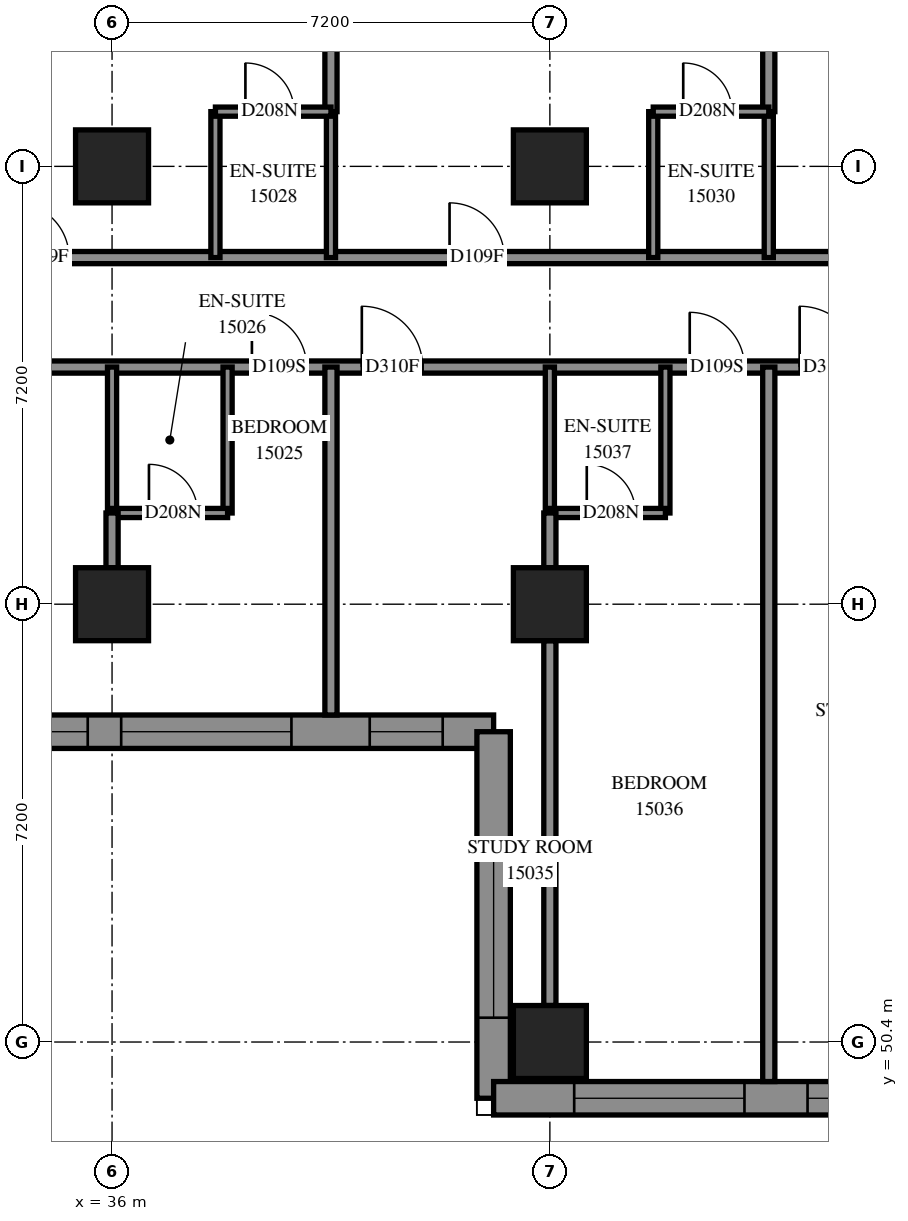
"""IFC4 building model, lengths in metres.
Left out: names, types, materials, properties, quantities, classifications, styles, units other than length and angle.
Written with IfcOpenShell. Run it as: python <this file> out.ifc"""

import sys

from ifc_helpers import new_model, si_unit, direction, frame, frame_2d, origin, origin_2d, place, context, subcontext, project, spatial, polyline, rectangle, outline, extrude, element, fill, save


model = new_model("IFC4")
c1 = context("Model", 3, precision=1e-05, world=origin(), true_north=direction((0.0, 1.0)))
c2 = subcontext(c1, "Body", "Model", "MODEL_VIEW")
j1 = project(units=[si_unit("LENGTHUNIT", "METRE"), si_unit("PLANEANGLEUNIT", "RADIAN")], contexts=[c1])
p1 = place(None, origin())
s1 = spatial("IfcSite", under=j1, at=p1, CompositionType="ELEMENT")
p2 = place(p1, origin())
s2 = spatial("IfcBuilding", under=s1, at=p2, CompositionType="ELEMENT")
p3 = place(p2, frame((0.0, 0.0, 57.6)))
s3 = spatial("IfcBuildingStorey", under=s2, at=p3, CompositionType="ELEMENT", Elevation=57.6)
for number, where, z_axis, x_axis in (
    (1, (36.0, 57.6, 0.0), (0.0, 0.0, 1.0), (1.0, 0.0, 0.0)),
    (2, (36.0, 64.8, 0.0), (0.0, 0.0, 1.0), (1.0, 0.0, 0.0)),
    (3, (43.2, 50.4, 0.0), (0.0, 0.0, 1.0), (1.0, 0.0, 0.0)),
    (4, (43.2, 57.6, 0.0), (0.0, 0.0, 1.0), (1.0, 0.0, 0.0)),
    (5, (43.2, 64.8, 0.0), (0.0, 0.0, 1.0), (1.0, 0.0, 0.0)),
):
    element("IfcColumn", number, at=place(p3, frame(where, z_axis=z_axis, x_axis=x_axis)), inside=s3, PredefinedType="COLUMN", context=c2, shape_type="SweptSolid", body=[
        extrude(rectangle(XDim=1.2, YDim=1.2, at=origin_2d()), origin(), (0.0, 0.0, 1.0), 3.1),
    ])
p4 = place(p3, frame((27.875, 55.503, 0.0), z_axis=(0.0, 0.0, 1.0), x_axis=(1.0, 0.0, 0.0)))
e6 = element("IfcWall", 6, at=p4, inside=s3, PredefinedType="SOLIDWALL", context=c2, shape_type="SweptSolid", body=[
    extrude(outline(polyline([(-0.275, -0.275), (14.125, -0.275), (14.675, 0.275), (0.275, 0.275), (-0.275, -0.275)])), origin(), (0.0, 0.0, 1.0), 3.1),
])
p5 = place(p4, frame((1.325, 0.0, 0.5)))
e7 = element("IfcOpeningElement", 7, at=p5, cuts=e6, PredefinedType="OPENING", context=c2, shape_type="SweptSolid", body=[
    extrude(rectangle(XDim=2.8, YDim=2.45, at=frame_2d((1.4, 1.225))), frame((0.0, 0.285, 0.0), z_axis=(0.0, -1.0, 0.0), x_axis=(1.0, 0.0, 0.0)), (0.0, 0.0, 1.0), 0.57),
])
p6 = place(p4, frame((4.925, 0.0, 0.5)))
e8 = element("IfcOpeningElement", 8, at=p6, cuts=e6, PredefinedType="OPENING", context=c2, shape_type="SweptSolid", body=[
    extrude(rectangle(XDim=2.8, YDim=2.45, at=frame_2d((1.4, 1.225))), frame((0.0, 0.285, 0.0), z_axis=(0.0, -1.0, 0.0), x_axis=(1.0, 0.0, 0.0)), (0.0, 0.0, 1.0), 0.57),
])
p7 = place(p4, frame((8.275, 0.0, 0.5)))
e9 = element("IfcOpeningElement", 9, at=p7, cuts=e6, PredefinedType="OPENING", context=c2, shape_type="SweptSolid", body=[
    extrude(rectangle(XDim=2.8, YDim=2.45, at=frame_2d((1.4, 1.225))), frame((0.0, 0.285, 0.0), z_axis=(0.0, -1.0, 0.0), x_axis=(1.0, 0.0, 0.0)), (0.0, 0.0, 1.0), 0.57),
])
p8 = place(p4, frame((12.363, 0.0, 0.5)))
e10 = element("IfcOpeningElement", 10, at=p8, cuts=e6, PredefinedType="OPENING", context=c2, shape_type="SweptSolid", body=[
    extrude(rectangle(XDim=1.2, YDim=2.45, at=frame_2d((0.6, 1.225))), frame((0.0, 0.285, 0.0), z_axis=(0.0, -1.0, 0.0), x_axis=(1.0, 0.0, 0.0)), (0.0, 0.0, 1.0), 0.57),
])
p9 = place(p3, frame((42.275, 55.503, 0.0), z_axis=(0.0, 0.0, 1.0), x_axis=(0.0, -1.0, 0.0)))
e11 = element("IfcWall", 11, at=p9, inside=s3, PredefinedType="SOLIDWALL", context=c2, shape_type="SweptSolid", body=[
    extrude(outline(polyline([(0.275, -0.275), (6.303, -0.275), (5.753, 0.275), (-0.275, 0.275), (0.275, -0.275)])), origin(), (0.0, 0.0, 1.0), 3.1),
])
p10 = place(p9, frame((1.903, 0.0, 0.5)))
e12 = element("IfcOpeningElement", 12, at=p10, cuts=e11, PredefinedType="OPENING", context=c2, shape_type="SweptSolid", body=[
    extrude(rectangle(XDim=2.8, YDim=2.45, at=frame_2d((1.4, 1.225))), frame((0.0, 0.285, 0.0), z_axis=(0.0, -1.0, 0.0), x_axis=(1.0, 0.0, 0.0)), (0.0, 0.0, 1.0), 0.57),
])
p11 = place(p3, frame((42.275, 49.475, 0.0), z_axis=(0.0, 0.0, 1.0), x_axis=(1.0, 0.0, 0.0)))
e13 = element("IfcWall", 13, at=p11, inside=s3, PredefinedType="SOLIDWALL", context=c2, shape_type="SweptSolid", body=[
    extrude(outline(polyline([(-0.275, -0.275), (6.925, -0.275), (7.475, 0.275), (0.275, 0.275), (-0.275, -0.275)])), origin(), (0.0, 0.0, 1.0), 3.1),
])
p12 = place(p11, frame((1.325, 0.0, 0.5)))
e14 = element("IfcOpeningElement", 14, at=p12, cuts=e13, PredefinedType="OPENING", context=c2, shape_type="SweptSolid", body=[
    extrude(rectangle(XDim=2.8, YDim=2.45, at=frame_2d((1.4, 1.225))), frame((0.0, 0.285, 0.0), z_axis=(0.0, -1.0, 0.0), x_axis=(1.0, 0.0, 0.0)), (0.0, 0.0, 1.0), 0.57),
])
p13 = place(p11, frame((5.162, 0.0, 0.5)))
e15 = element("IfcOpeningElement", 15, at=p13, cuts=e13, PredefinedType="OPENING", context=c2, shape_type="SweptSolid", body=[
    extrude(rectangle(XDim=1.2, YDim=2.45, at=frame_2d((0.6, 1.225))), frame((0.0, 0.285, 0.0), z_axis=(0.0, -1.0, 0.0), x_axis=(1.0, 0.0, 0.0)), (0.0, 0.0, 1.0), 0.57),
])
p14 = place(p3, frame((28.8, 61.5, 0.0), z_axis=(0.0, 0.0, 1.0), x_axis=(1.0, 0.0, 0.0)))
e16 = element("IfcWall", 16, at=p14, inside=s3, PredefinedType="PARTITIONING", context=c2, shape_type="SweptSolid", body=[
    extrude(rectangle(XDim=24.3, YDim=0.2, at=frame_2d((12.15, 0.0))), origin(), (0.0, 0.0, 1.0), 3.1),
])
p15 = place(p14, frame((3.899, 0.0, 0.0)))
e17 = element("IfcOpeningElement", 17, at=p15, cuts=e16, PredefinedType="OPENING", context=c2, shape_type="SweptSolid", body=[
    extrude(rectangle(XDim=0.9, YDim=2.1, at=frame_2d((0.45, 1.05))), frame((0.0, 0.11, 0.0), z_axis=(0.0, -1.0, 0.0), x_axis=(1.0, 0.0, 0.0)), (0.0, 0.0, 1.0), 0.22),
])
p16 = place(p14, frame((9.5, 0.0, 0.0)))
e18 = element("IfcOpeningElement", 18, at=p16, cuts=e16, PredefinedType="OPENING", context=c2, shape_type="SweptSolid", body=[
    extrude(rectangle(XDim=0.9, YDim=2.1, at=frame_2d((0.45, 1.05))), frame((0.0, 0.11, 0.0), z_axis=(0.0, -1.0, 0.0), x_axis=(1.0, 0.0, 0.0)), (0.0, 0.0, 1.0), 0.22),
])
p17 = place(p14, frame((11.307, 0.0, 0.0)))
e19 = element("IfcOpeningElement", 19, at=p17, cuts=e16, PredefinedType="OPENING", context=c2, shape_type="SweptSolid", body=[
    extrude(rectangle(XDim=1.0, YDim=2.1, at=frame_2d((0.5, 1.05))), frame((0.0, 0.11, 0.0), z_axis=(0.0, -1.0, 0.0), x_axis=(1.0, 0.0, 0.0)), (0.0, 0.0, 1.0), 0.22),
])
p18 = place(p14, frame((16.7, 0.0, 0.0)))
e20 = element("IfcOpeningElement", 20, at=p18, cuts=e16, PredefinedType="OPENING", context=c2, shape_type="SweptSolid", body=[
    extrude(rectangle(XDim=0.9, YDim=2.1, at=frame_2d((0.45, 1.05))), frame((0.0, 0.11, 0.0), z_axis=(0.0, -1.0, 0.0), x_axis=(1.0, 0.0, 0.0)), (0.0, 0.0, 1.0), 0.22),
])
p19 = place(p14, frame((18.508, 0.0, 0.0)))
e21 = element("IfcOpeningElement", 21, at=p19, cuts=e16, PredefinedType="OPENING", context=c2, shape_type="SweptSolid", body=[
    extrude(rectangle(XDim=1.0, YDim=2.1, at=frame_2d((0.5, 1.05))), frame((0.0, 0.11, 0.0), z_axis=(0.0, -1.0, 0.0), x_axis=(1.0, 0.0, 0.0)), (0.0, 0.0, 1.0), 0.22),
])
p20 = place(p14, frame((23.033, 0.0, 0.0)))
e22 = element("IfcOpeningElement", 22, at=p20, cuts=e16, PredefinedType="OPENING", context=c2, shape_type="SweptSolid", body=[
    extrude(rectangle(XDim=1.0, YDim=2.1, at=frame_2d((0.5, 1.05))), frame((0.0, 0.11, 0.0), z_axis=(0.0, -1.0, 0.0), x_axis=(1.0, 0.0, 0.0)), (0.0, 0.0, 1.0), 0.22),
])
p21 = place(p3, frame((33.302, 63.3, 0.0), z_axis=(0.0, 0.0, 1.0), x_axis=(1.0, 0.0, 0.0)))
e23 = element("IfcWall", 23, at=p21, inside=s3, PredefinedType="PARTITIONING", context=c2, shape_type="SweptSolid", body=[
    extrude(rectangle(XDim=21.798, YDim=0.2, at=frame_2d((10.899, 0.0))), origin(), (0.0, 0.0, 1.0), 3.1),
])
p22 = place(p21, frame((1.091, 0.0, 0.0)))
e24 = element("IfcOpeningElement", 24, at=p22, cuts=e23, PredefinedType="OPENING", context=c2, shape_type="SweptSolid", body=[
    extrude(rectangle(XDim=0.9, YDim=2.1, at=frame_2d((0.45, 1.05))), frame((0.0, 0.11, 0.0), z_axis=(0.0, -1.0, 0.0), x_axis=(1.0, 0.0, 0.0)), (0.0, 0.0, 1.0), 0.22),
])
p23 = place(p21, frame((8.248, 0.0, 0.0)))
e25 = element("IfcOpeningElement", 25, at=p23, cuts=e23, PredefinedType="OPENING", context=c2, shape_type="SweptSolid", body=[
    extrude(rectangle(XDim=0.9, YDim=2.1, at=frame_2d((0.45, 1.05))), frame((0.0, 0.11, 0.0), z_axis=(0.0, -1.0, 0.0), x_axis=(1.0, 0.0, 0.0)), (0.0, 0.0, 1.0), 0.22),
])
p24 = place(p21, frame((15.448, 0.0, 0.0)))
e26 = element("IfcOpeningElement", 26, at=p24, cuts=e23, PredefinedType="OPENING", context=c2, shape_type="SweptSolid", body=[
    extrude(rectangle(XDim=0.9, YDim=2.1, at=frame_2d((0.45, 1.05))), frame((0.0, 0.11, 0.0), z_axis=(0.0, -1.0, 0.0), x_axis=(1.0, 0.0, 0.0)), (0.0, 0.0, 1.0), 0.22),
])
p25 = place(p3, frame((46.8, 49.75, 0.0), z_axis=(0.0, 0.0, 1.0), x_axis=(0.0, 1.0, 0.0)))
e27 = element("IfcWall", 27, at=p25, inside=s3, PredefinedType="PARTITIONING", context=c2, shape_type="SweptSolid", body=[
    extrude(rectangle(XDim=11.75, YDim=0.2, at=frame_2d((5.875, 0.0))), origin(), (0.0, 0.0, 1.0), 3.1),
])
p26 = place(p3, frame((39.6, 65.7, 0.0), z_axis=(0.0, 0.0, 1.0), x_axis=(0.0, 1.0, 0.0)))
e28 = element("IfcWall", 28, at=p26, inside=s3, PredefinedType="PARTITIONING", context=c2, shape_type="SweptSolid", body=[
    extrude(rectangle(XDim=7.143, YDim=0.2, at=frame_2d((3.571, 0.0))), origin(), (0.0, 0.0, 1.0), 3.1),
])
p27 = place(p3, frame((46.8, 65.7, 0.0), z_axis=(0.0, 0.0, 1.0), x_axis=(0.0, 1.0, 0.0)))
e29 = element("IfcWall", 29, at=p27, inside=s3, PredefinedType="PARTITIONING", context=c2, shape_type="SweptSolid", body=[
    extrude(rectangle(XDim=7.08, YDim=0.2, at=frame_2d((3.54, 0.0))), origin(), (0.0, 0.0, 1.0), 3.1),
])
p28 = place(p3, frame((43.2, 51.0, 0.0), z_axis=(0.0, 0.0, 1.0), x_axis=(0.0, 1.0, 0.0)))
e30 = element("IfcWall", 30, at=p28, inside=s3, PredefinedType="PARTITIONING", context=c2, shape_type="SweptSolid", body=[
    extrude(rectangle(XDim=6.0, YDim=0.2, at=frame_2d((3.0, 0.0))), origin(), (0.0, 0.0, 1.0), 2.6),
])
p29 = place(p3, frame((39.6, 55.778, 0.0), z_axis=(0.0, 0.0, 1.0), x_axis=(0.0, 1.0, 0.0)))
e31 = element("IfcWall", 31, at=p29, inside=s3, PredefinedType="PARTITIONING", context=c2, shape_type="SweptSolid", body=[
    extrude(rectangle(XDim=5.722, YDim=0.2, at=frame_2d((2.861, 0.0))), origin(), (0.0, 0.0, 1.0), 3.1),
])
for number, where, z_axis, x_axis in (
    (32, (37.7, 63.3, 0.0), (0.0, 0.0, 1.0), (0.0, 1.0, 0.0)),
    (33, (39.6, 63.3, 0.0), (0.0, 0.0, 1.0), (0.0, 1.0, 0.0)),
    (34, (44.9, 63.3, 0.0), (0.0, 0.0, 1.0), (0.0, 1.0, 0.0)),
    (35, (46.8, 63.3, 0.0), (0.0, 0.0, 1.0), (0.0, 1.0, 0.0)),
    (36, (37.9, 59.1, 0.0), (0.0, 0.0, 1.0), (0.0, 1.0, 0.0)),
    (37, (36.0, 59.1, 0.0), (0.0, 0.0, 1.0), (0.0, 1.0, 0.0)),
    (38, (45.1, 59.1, 0.0), (0.0, 0.0, 1.0), (0.0, 1.0, 0.0)),
    (39, (43.2, 59.1, 0.0), (0.0, 0.0, 1.0), (0.0, 1.0, 0.0)),
):
    element("IfcWall", number, at=place(p3, frame(where, z_axis=z_axis, x_axis=x_axis)), inside=s3, PredefinedType="PARTITIONING", context=c2, shape_type="SweptSolid", body=[
        extrude(rectangle(XDim=2.4, YDim=0.15, at=frame_2d((1.2, 0.0))), origin(), (0.0, 0.0, 1.0), 3.1),
    ])
p30 = place(p3, frame((36.0, 59.1, 0.0), z_axis=(0.0, 0.0, 1.0), x_axis=(1.0, 0.0, 0.0)))
e40 = element("IfcWall", 40, at=p30, inside=s3, PredefinedType="PARTITIONING", context=c2, shape_type="SweptSolid", body=[
    extrude(rectangle(XDim=1.9, YDim=0.15, at=frame_2d((0.95, 0.0))), origin(), (0.0, 0.0, 1.0), 3.1),
])
p31 = place(p30, frame((0.607, 0.0, 0.0)))
e41 = element("IfcOpeningElement", 41, at=p31, cuts=e40, PredefinedType="OPENING", context=c2, shape_type="SweptSolid", body=[
    extrude(rectangle(XDim=0.8, YDim=2.1, at=frame_2d((0.4, 1.05))), frame((0.0, 0.085, 0.0), z_axis=(0.0, -1.0, 0.0), x_axis=(1.0, 0.0, 0.0)), (0.0, 0.0, 1.0), 0.17),
])
p32 = place(p3, frame((43.2, 59.1, 0.0), z_axis=(0.0, 0.0, 1.0), x_axis=(1.0, 0.0, 0.0)))
e42 = element("IfcWall", 42, at=p32, inside=s3, PredefinedType="PARTITIONING", context=c2, shape_type="SweptSolid", body=[
    extrude(rectangle(XDim=1.9, YDim=0.15, at=frame_2d((0.95, 0.0))), origin(), (0.0, 0.0, 1.0), 3.1),
])
p33 = place(p32, frame((0.607, 0.0, 0.0)))
e43 = element("IfcOpeningElement", 43, at=p33, cuts=e42, PredefinedType="OPENING", context=c2, shape_type="SweptSolid", body=[
    extrude(rectangle(XDim=0.8, YDim=2.1, at=frame_2d((0.4, 1.05))), frame((0.0, 0.085, 0.0), z_axis=(0.0, -1.0, 0.0), x_axis=(1.0, 0.0, 0.0)), (0.0, 0.0, 1.0), 0.17),
])
p34 = place(p3, frame((37.7, 65.7, 0.0), z_axis=(0.0, 0.0, 1.0), x_axis=(1.0, 0.0, 0.0)))
e44 = element("IfcWall", 44, at=p34, inside=s3, PredefinedType="PARTITIONING", context=c2, shape_type="SweptSolid", body=[
    extrude(rectangle(XDim=1.9, YDim=0.15, at=frame_2d((0.95, 0.0))), origin(), (0.0, 0.0, 1.0), 3.1),
])
p35 = place(p34, frame((0.493, 0.0, 0.0)))
e45 = element("IfcOpeningElement", 45, at=p35, cuts=e44, PredefinedType="OPENING", context=c2, shape_type="SweptSolid", body=[
    extrude(rectangle(XDim=0.8, YDim=2.1, at=frame_2d((0.4, 1.05))), frame((0.0, 0.085, 0.0), z_axis=(0.0, -1.0, 0.0), x_axis=(1.0, 0.0, 0.0)), (0.0, 0.0, 1.0), 0.17),
])
p36 = place(p3, frame((44.9, 65.7, 0.0), z_axis=(0.0, 0.0, 1.0), x_axis=(1.0, 0.0, 0.0)))
e46 = element("IfcWall", 46, at=p36, inside=s3, PredefinedType="PARTITIONING", context=c2, shape_type="SweptSolid", body=[
    extrude(rectangle(XDim=1.9, YDim=0.15, at=frame_2d((0.95, 0.0))), origin(), (0.0, 0.0, 1.0), 3.1),
])
p37 = place(p36, frame((0.493, 0.0, 0.0)))
e47 = element("IfcOpeningElement", 47, at=p37, cuts=e46, PredefinedType="OPENING", context=c2, shape_type="SweptSolid", body=[
    extrude(rectangle(XDim=0.8, YDim=2.1, at=frame_2d((0.4, 1.05))), frame((0.0, 0.085, 0.0), z_axis=(0.0, -1.0, 0.0), x_axis=(1.0, 0.0, 0.0)), (0.0, 0.0, 1.0), 0.17),
])
for number, where, z_axis, x_axis in (
    (48, (36.0, 58.2, 0.0), (0.0, 0.0, 1.0), (0.0, 1.0, 0.0)),
    (49, (43.2, 58.2, 0.0), (0.0, 0.0, 1.0), (0.0, 1.0, 0.0)),
):
    element("IfcWall", number, at=place(p3, frame(where, z_axis=z_axis, x_axis=x_axis)), inside=s3, PredefinedType="PARTITIONING", context=c2, shape_type="SweptSolid", body=[
        extrude(rectangle(XDim=0.9, YDim=0.2, at=frame_2d((0.45, 0.0))), origin(), (0.0, 0.0, 1.0), 3.1),
    ])
p38 = place(p6, origin())
e50 = element("IfcWindow", 50, at=p38, inside=s3, PartitioningType="SINGLE_PANEL", PredefinedType="WINDOW", context=c2, shape_type="SweptSolid", body=[
    extrude(rectangle(XDim=2.8, YDim=2.45, at=frame_2d((1.4, 1.225))), frame((0.0, 0.155, 0.0), z_axis=(0.0, -1.0, 0.0), x_axis=(1.0, 0.0, 0.0)), (0.0, 0.0, 1.0), 0.06),
])
fill(e8, e50)
p39 = place(p7, origin())
e51 = element("IfcWindow", 51, at=p39, inside=s3, PartitioningType="SINGLE_PANEL", PredefinedType="WINDOW", context=c2, shape_type="SweptSolid", body=[
    extrude(rectangle(XDim=2.8, YDim=2.45, at=frame_2d((1.4, 1.225))), frame((0.0, 0.155, 0.0), z_axis=(0.0, -1.0, 0.0), x_axis=(1.0, 0.0, 0.0)), (0.0, 0.0, 1.0), 0.06),
])
fill(e9, e51)
p40 = place(p8, origin())
e52 = element("IfcWindow", 52, at=p40, inside=s3, PartitioningType="SINGLE_PANEL", PredefinedType="WINDOW", context=c2, shape_type="SweptSolid", body=[
    extrude(rectangle(XDim=1.2, YDim=2.45, at=frame_2d((0.6, 1.225))), frame((0.0, 0.155, 0.0), z_axis=(0.0, -1.0, 0.0), x_axis=(1.0, 0.0, 0.0)), (0.0, 0.0, 1.0), 0.06),
])
fill(e10, e52)
p41 = place(p10, origin())
e53 = element("IfcWindow", 53, at=p41, inside=s3, PartitioningType="SINGLE_PANEL", PredefinedType="WINDOW", context=c2, shape_type="SweptSolid", body=[
    extrude(rectangle(XDim=2.8, YDim=2.45, at=frame_2d((1.4, 1.225))), frame((0.0, 0.155, 0.0), z_axis=(0.0, -1.0, 0.0), x_axis=(1.0, 0.0, 0.0)), (0.0, 0.0, 1.0), 0.06),
])
fill(e12, e53)
p42 = place(p12, origin())
e54 = element("IfcWindow", 54, at=p42, inside=s3, PartitioningType="SINGLE_PANEL", PredefinedType="WINDOW", context=c2, shape_type="SweptSolid", body=[
    extrude(rectangle(XDim=2.8, YDim=2.45, at=frame_2d((1.4, 1.225))), frame((0.0, 0.155, 0.0), z_axis=(0.0, -1.0, 0.0), x_axis=(1.0, 0.0, 0.0)), (0.0, 0.0, 1.0), 0.06),
])
fill(e14, e54)
p43 = place(p13, origin())
e55 = element("IfcWindow", 55, at=p43, inside=s3, PartitioningType="SINGLE_PANEL", PredefinedType="WINDOW", context=c2, shape_type="SweptSolid", body=[
    extrude(rectangle(XDim=1.2, YDim=2.45, at=frame_2d((0.6, 1.225))), frame((0.0, 0.155, 0.0), z_axis=(0.0, -1.0, 0.0), x_axis=(1.0, 0.0, 0.0)), (0.0, 0.0, 1.0), 0.06),
])
fill(e15, e55)
p44 = place(p16, origin())
e56 = element("IfcDoor", 56, at=p44, inside=s3, OperationType="SINGLE_SWING_LEFT", PredefinedType="DOOR", context=c2, shape_type="SweptSolid", body=[
    extrude(rectangle(XDim=0.9, YDim=2.1, at=frame_2d((0.45, 1.05))), frame((0.0, 0.025, 0.0), z_axis=(0.0, -1.0, 0.0), x_axis=(1.0, 0.0, 0.0)), (0.0, 0.0, 1.0), 0.05),
])
fill(e18, e56)
p45 = place(p31, origin())
e57 = element("IfcDoor", 57, at=p45, inside=s3, OperationType="SINGLE_SWING_RIGHT", PredefinedType="DOOR", context=c2, shape_type="SweptSolid", body=[
    extrude(rectangle(XDim=0.8, YDim=2.1, at=frame_2d((0.4, 1.05))), frame((0.0, 0.025, 0.0), z_axis=(0.0, -1.0, 0.0), x_axis=(1.0, 0.0, 0.0)), (0.0, 0.0, 1.0), 0.05),
])
fill(e41, e57)
p46 = place(p22, origin())
e58 = element("IfcDoor", 58, at=p46, inside=s3, OperationType="SINGLE_SWING_LEFT", PredefinedType="DOOR", context=c2, shape_type="SweptSolid", body=[
    extrude(rectangle(XDim=0.9, YDim=2.1, at=frame_2d((0.45, 1.05))), frame((0.0, 0.025, 0.0), z_axis=(0.0, -1.0, 0.0), x_axis=(1.0, 0.0, 0.0)), (0.0, 0.0, 1.0), 0.05),
])
fill(e24, e58)
p47 = place(p35, origin())
e59 = element("IfcDoor", 59, at=p47, inside=s3, OperationType="SINGLE_SWING_RIGHT", PredefinedType="DOOR", context=c2, shape_type="SweptSolid", body=[
    extrude(rectangle(XDim=0.8, YDim=2.1, at=frame_2d((0.4, 1.05))), frame((0.0, 0.025, 0.0), z_axis=(0.0, -1.0, 0.0), x_axis=(1.0, 0.0, 0.0)), (0.0, 0.0, 1.0), 0.05),
])
fill(e45, e59)
p48 = place(p23, origin())
e60 = element("IfcDoor", 60, at=p48, inside=s3, OperationType="SINGLE_SWING_LEFT", PredefinedType="DOOR", context=c2, shape_type="SweptSolid", body=[
    extrude(rectangle(XDim=0.9, YDim=2.1, at=frame_2d((0.45, 1.05))), frame((0.0, 0.025, 0.0), z_axis=(0.0, -1.0, 0.0), x_axis=(1.0, 0.0, 0.0)), (0.0, 0.0, 1.0), 0.05),
])
fill(e25, e60)
p49 = place(p37, origin())
e61 = element("IfcDoor", 61, at=p49, inside=s3, OperationType="SINGLE_SWING_RIGHT", PredefinedType="DOOR", context=c2, shape_type="SweptSolid", body=[
    extrude(rectangle(XDim=0.8, YDim=2.1, at=frame_2d((0.4, 1.05))), frame((0.0, 0.025, 0.0), z_axis=(0.0, -1.0, 0.0), x_axis=(1.0, 0.0, 0.0)), (0.0, 0.0, 1.0), 0.05),
])
fill(e47, e61)
p50 = place(p17, origin())
e62 = element("IfcDoor", 62, at=p50, inside=s3, OperationType="SINGLE_SWING_RIGHT", PredefinedType="DOOR", context=c2, shape_type="SweptSolid", body=[
    extrude(rectangle(XDim=1.0, YDim=2.1, at=frame_2d((0.5, 1.05))), frame((0.0, 0.025, 0.0), z_axis=(0.0, -1.0, 0.0), x_axis=(1.0, 0.0, 0.0)), (0.0, 0.0, 1.0), 0.05),
])
fill(e19, e62)
p51 = place(p18, origin())
e63 = element("IfcDoor", 63, at=p51, inside=s3, OperationType="SINGLE_SWING_LEFT", PredefinedType="DOOR", context=c2, shape_type="SweptSolid", body=[
    extrude(rectangle(XDim=0.9, YDim=2.1, at=frame_2d((0.45, 1.05))), frame((0.0, 0.025, 0.0), z_axis=(0.0, -1.0, 0.0), x_axis=(1.0, 0.0, 0.0)), (0.0, 0.0, 1.0), 0.05),
])
fill(e20, e63)
p52 = place(p33, origin())
e64 = element("IfcDoor", 64, at=p52, inside=s3, OperationType="SINGLE_SWING_RIGHT", PredefinedType="DOOR", context=c2, shape_type="SweptSolid", body=[
    extrude(rectangle(XDim=0.8, YDim=2.1, at=frame_2d((0.4, 1.05))), frame((0.0, 0.025, 0.0), z_axis=(0.0, -1.0, 0.0), x_axis=(1.0, 0.0, 0.0)), (0.0, 0.0, 1.0), 0.05),
])
fill(e43, e64)
p53 = place(p19, origin())
e65 = element("IfcDoor", 65, at=p53, inside=s3, OperationType="SINGLE_SWING_RIGHT", PredefinedType="DOOR", context=c2, shape_type="SweptSolid", body=[
    extrude(rectangle(XDim=1.0, YDim=2.1, at=frame_2d((0.5, 1.05))), frame((0.0, 0.025, 0.0), z_axis=(0.0, -1.0, 0.0), x_axis=(1.0, 0.0, 0.0)), (0.0, 0.0, 1.0), 0.05),
])
fill(e21, e65)
save(model, sys.argv[1])
